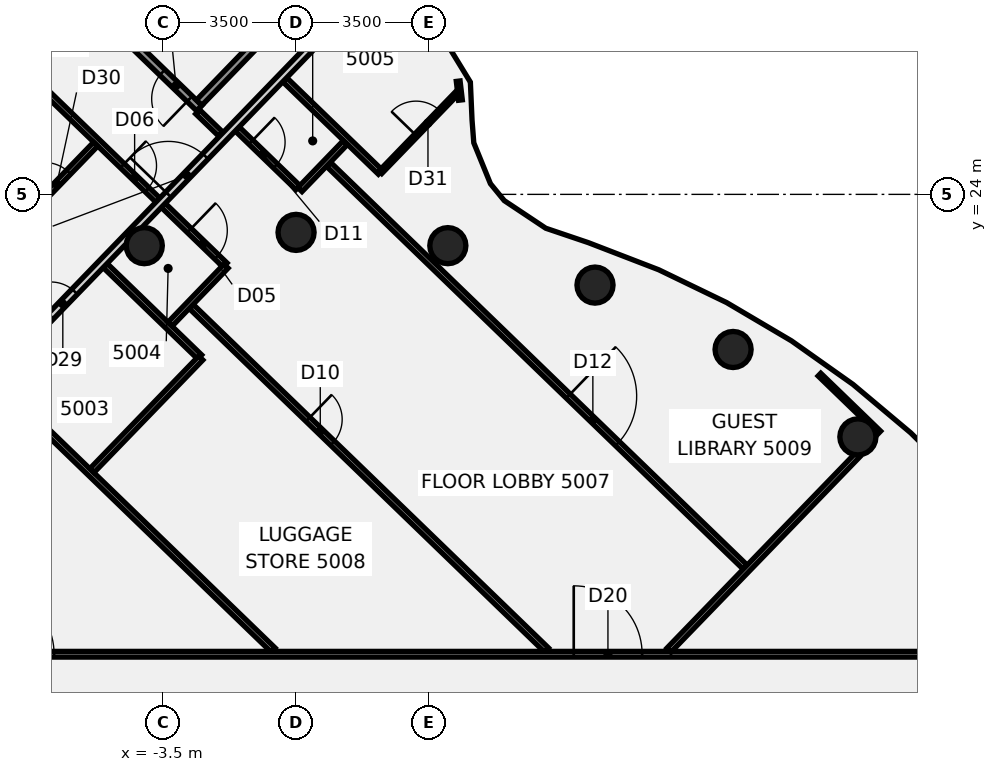
"""IFC4 building model, lengths in metres.
Left out: names, types, materials, properties, quantities, classifications, styles, units other than length and angle.
Written with IfcOpenShell. Run it as: python <this file> out.ifc"""

import sys

from ifc_helpers import new_model, si_unit, direction, frame, frame_2d, origin, origin_2d, place, context, subcontext, project, spatial, rectangle, circle, extrude, element, fill, save


model = new_model("IFC4")
c1 = context("Model", 3, precision=1e-05, world=origin(), true_north=direction((0.0, 1.0)))
c2 = subcontext(c1, "Body", "Model", "MODEL_VIEW")
j1 = project(units=[si_unit("LENGTHUNIT", "METRE"), si_unit("PLANEANGLEUNIT", "RADIAN")], contexts=[c1])
p1 = place(None, origin())
s1 = spatial("IfcSite", under=j1, at=p1, CompositionType="ELEMENT")
p2 = place(p1, origin())
s2 = spatial("IfcBuilding", under=s1, at=p2, CompositionType="ELEMENT")
p3 = place(p2, frame((0.0, 0.0, 200.5)))
s3 = spatial("IfcBuildingStorey", under=s2, at=p3, CompositionType="ELEMENT", Elevation=200.5)
for number, where, z_axis, x_axis in (
    (1, (14.784, 17.619, -0.14), (0.0, 0.0, 1.0), (1.0, 0.0, 0.0)),
    (2, (11.5, 19.919, -0.14), (0.0, 0.0, 1.0), (1.0, 0.0, 0.0)),
    (3, (7.866, 21.613, -0.14), (0.0, 0.0, 1.0), (1.0, 0.0, 0.0)),
    (4, (3.994, 22.651, -0.14), (0.0, 0.0, 1.0), (1.0, 0.0, 0.0)),
    (5, (0.0, 23.0, -0.14), (0.0, 0.0, 1.0), (1.0, 0.0, 0.0)),
    (6, (-3.994, 22.651, -0.14), (0.0, 0.0, 1.0), (1.0, 0.0, 0.0)),
):
    element("IfcColumn", number, at=place(p3, frame(where, z_axis=z_axis, x_axis=x_axis)), inside=s3, PredefinedType="COLUMN", context=c2, shape_type="SweptSolid", body=[
        extrude(circle(Radius=0.475, at=origin_2d()), origin(), (0.0, 0.0, 1.0), 3.6),
    ])
p4 = place(p3, frame((-11.71, 22.75, 0.0), z_axis=(0.0, 0.0, 1.0), x_axis=(0.718952314135, -0.695059400339, 0.0)))
e7 = element("IfcWall", 7, at=p4, inside=s3, PredefinedType="PARTITIONING", context=c2, shape_type="SweptSolid", body=[
    extrude(rectangle(XDim=15.45, YDim=0.15, at=frame_2d((7.725, 0.0))), origin(), (0.0, 0.0, 1.0), 2.864),
])
p5 = place(p3, frame((-9.979, 29.977, 0.0), z_axis=(0.0, 0.0, 1.0), x_axis=(0.719187723666, -0.694815815975, 0.0)))
e8 = element("IfcWall", 8, at=p5, inside=s3, PredefinedType="PARTITIONING", context=c2, shape_type="SweptSolid", body=[
    extrude(rectangle(XDim=11.28, YDim=0.15, at=frame_2d((5.64, 0.0))), origin(), (0.0, 0.0, 1.0), 2.864),
])
p6 = place(p5, frame((9.97, 0.0, 0.0)))
e9 = element("IfcOpeningElement", 9, at=p6, cuts=e8, PredefinedType="OPENING", context=c2, shape_type="SweptSolid", body=[
    extrude(rectangle(XDim=1.0, YDim=2.1, at=frame_2d((0.5, 1.05))), frame((0.0, 0.085, 0.0), z_axis=(0.0, -1.0, 0.0), x_axis=(1.0, 0.0, 0.0)), (0.0, 0.0, 1.0), 0.17),
])
p7 = place(p5, frame((7.519, 0.0, 0.0)))
e10 = element("IfcOpeningElement", 10, at=p7, cuts=e8, PredefinedType="OPENING", context=c2, shape_type="SweptSolid", body=[
    extrude(rectangle(XDim=0.9, YDim=2.1, at=frame_2d((0.45, 1.05))), frame((0.0, 0.085, 0.0), z_axis=(0.0, -1.0, 0.0), x_axis=(1.0, 0.0, 0.0)), (0.0, 0.0, 1.0), 0.17),
])
p8 = place(p5, frame((0.82, 0.0, 0.0)))
e11 = element("IfcOpeningElement", 11, at=p8, cuts=e8, PredefinedType="OPENING", context=c2, shape_type="SweptSolid", body=[
    extrude(rectangle(XDim=0.9, YDim=2.1, at=frame_2d((0.45, 1.05))), frame((0.0, 0.085, 0.0), z_axis=(0.0, -1.0, 0.0), x_axis=(1.0, 0.0, 0.0)), (0.0, 0.0, 1.0), 0.17),
])
p9 = place(p3, frame((-2.588, 26.171, 0.0), z_axis=(0.0, 0.0, 1.0), x_axis=(0.718920607155, -0.695092195761, 0.0)))
e12 = element("IfcWall", 12, at=p9, inside=s3, PredefinedType="PARTITIONING", context=c2, shape_type="SweptSolid", body=[
    extrude(rectangle(XDim=0.84, YDim=0.15, at=frame_2d((0.42, 0.0))), origin(), (0.0, 0.0, 1.0), 2.864),
])
p10 = place(p3, frame((-5.023, 22.127, 0.0), z_axis=(0.0, 0.0, 1.0), x_axis=(0.718790912946, -0.695226310971, 0.0)))
e13 = element("IfcWall", 13, at=p10, inside=s3, PredefinedType="PARTITIONING", context=c2, shape_type="SweptSolid", body=[
    extrude(rectangle(XDim=3.46, YDim=0.15, at=frame_2d((1.73, 0.0))), origin(), (0.0, 0.0, 1.0), 2.864),
])
p11 = place(p3, frame((-2.757, 21.048, 0.0), z_axis=(0.0, 0.0, 1.0), x_axis=(0.718984622922, -0.695025979371, 0.0)))
e14 = element("IfcWall", 14, at=p11, inside=s3, PredefinedType="PARTITIONING", context=c2, shape_type="SweptSolid", body=[
    extrude(rectangle(XDim=13.002, YDim=0.15, at=frame_2d((6.501, 0.0))), origin(), (0.0, 0.0, 1.0), 2.864),
])
p12 = place(p11, frame((4.27, 0.0, 0.0)))
e15 = element("IfcOpeningElement", 15, at=p12, cuts=e14, PredefinedType="OPENING", context=c2, shape_type="SweptSolid", body=[
    extrude(rectangle(XDim=0.9, YDim=2.1, at=frame_2d((0.45, 1.05))), frame((0.0, 0.085, 0.0), z_axis=(0.0, -1.0, 0.0), x_axis=(1.0, 0.0, 0.0)), (0.0, 0.0, 1.0), 0.17),
])
p13 = place(p3, frame((-1.548, 25.721, 0.0), z_axis=(0.0, 0.0, 1.0), x_axis=(0.718940736349, -0.695071375916, 0.0)))
e16 = element("IfcWall", 16, at=p13, inside=s3, PredefinedType="PARTITIONING", context=c2, shape_type="SweptSolid", body=[
    extrude(rectangle(XDim=2.219, YDim=0.15, at=frame_2d((1.11, 0.0))), origin(), (0.0, 0.0, 1.0), 2.864),
])
p14 = place(p13, frame((0.5, 0.0, 0.0)))
e17 = element("IfcOpeningElement", 17, at=p14, cuts=e16, PredefinedType="OPENING", context=c2, shape_type="SweptSolid", body=[
    extrude(rectangle(XDim=0.9, YDim=2.1, at=frame_2d((0.45, 1.05))), frame((0.0, 0.085, 0.0), z_axis=(0.0, -1.0, 0.0), x_axis=(1.0, 0.0, 0.0)), (0.0, 0.0, 1.0), 0.17),
])
p15 = place(p3, frame((-0.297, 27.017, 0.0), z_axis=(0.0, 0.0, 1.0), x_axis=(0.718866356864, -0.695148301422, 0.0)))
e18 = element("IfcWall", 18, at=p15, inside=s3, PredefinedType="PARTITIONING", context=c2, shape_type="SweptSolid", body=[
    extrude(rectangle(XDim=3.5, YDim=0.15, at=frame_2d((1.75, 0.0))), origin(), (0.0, 0.0, 1.0), 2.864),
])
p16 = place(p3, frame((0.857, 24.787, 0.0), z_axis=(0.0, 0.0, 1.0), x_axis=(0.718987308742, -0.695023200956, 0.0)))
e19 = element("IfcWall", 19, at=p16, inside=s3, PredefinedType="PARTITIONING", context=c2, shape_type="SweptSolid", body=[
    extrude(rectangle(XDim=15.241, YDim=0.15, at=frame_2d((7.621, 0.0))), origin(), (0.0, 0.0, 1.0), 2.864),
])
p17 = place(p16, frame((8.77, 0.0, 0.0)))
e20 = element("IfcOpeningElement", 20, at=p17, cuts=e19, PredefinedType="OPENING", context=c2, shape_type="SweptSolid", body=[
    extrude(rectangle(XDim=1.8, YDim=2.1, at=frame_2d((0.9, 1.05))), frame((0.0, 0.085, 0.0), z_axis=(0.0, -1.0, 0.0), x_axis=(1.0, 0.0, 0.0)), (0.0, 0.0, 1.0), 0.17),
])
p18 = place(p3, frame((13.773, 19.257, 0.0), z_axis=(0.0, 0.0, 1.0), x_axis=(0.718817623738, -0.695198693758, 0.0)))
e21 = element("IfcWall", 21, at=p18, inside=s3, PredefinedType="PARTITIONING", context=c2, shape_type="SweptSolid", body=[
    extrude(rectangle(XDim=2.191, YDim=0.1, at=frame_2d((1.096, 0.0))), origin(), (0.0, 0.0, 1.0), 2.864),
])
p19 = place(p3, frame((-17.065, 11.9, 0.0), z_axis=(0.0, 0.0, 1.0), x_axis=(1.0, 0.0, 0.0)))
e22 = element("IfcWall", 22, at=p19, inside=s3, PredefinedType="PARTITIONING", context=c2, shape_type="SweptSolid", body=[
    extrude(rectangle(XDim=34.165, YDim=0.15, at=frame_2d((17.083, 0.0))), origin(), (0.0, 0.0, 1.0), 2.864),
])
p20 = place(p19, frame((24.372, 0.0, 0.0)))
e23 = element("IfcOpeningElement", 23, at=p20, cuts=e22, PredefinedType="OPENING", context=c2, shape_type="SweptSolid", body=[
    extrude(rectangle(XDim=1.8, YDim=2.1, at=frame_2d((0.9, 1.05))), frame((0.0, 0.085, 0.0), z_axis=(0.0, -1.0, 0.0), x_axis=(1.0, 0.0, 0.0)), (0.0, 0.0, 1.0), 0.17),
])
p21 = place(p19, frame((8.898, 0.0, 0.0)))
e24 = element("IfcOpeningElement", 24, at=p21, cuts=e22, PredefinedType="OPENING", context=c2, shape_type="SweptSolid", body=[
    extrude(rectangle(XDim=1.8, YDim=2.1, at=frame_2d((0.9, 1.05))), frame((0.0, 0.085, 0.0), z_axis=(0.0, -1.0, 0.0), x_axis=(1.0, 0.0, 0.0)), (0.0, 0.0, 1.0), 0.17),
])
p22 = place(p19, frame((3.048, 0.0, 0.0)))
e25 = element("IfcOpeningElement", 25, at=p22, cuts=e22, PredefinedType="OPENING", context=c2, shape_type="SweptSolid", body=[
    extrude(rectangle(XDim=1.8, YDim=2.1, at=frame_2d((0.9, 1.05))), frame((0.0, 0.085, 0.0), z_axis=(0.0, -1.0, 0.0), x_axis=(1.0, 0.0, 0.0)), (0.0, 0.0, 1.0), 0.17),
])
p23 = place(p3, frame((-13.883, 26.055, 0.0), z_axis=(0.0, 0.0, 1.0), x_axis=(0.695083477894, 0.718929035969, 0.0)))
e26 = element("IfcWall", 26, at=p23, inside=s3, PredefinedType="PARTITIONING", context=c2, shape_type="SweptSolid", body=[
    extrude(rectangle(XDim=13.433, YDim=0.15, at=frame_2d((6.716, 0.0))), origin(), (0.0, 0.0, 1.0), 2.864),
])
p24 = place(p23, frame((5.833, 0.0, 0.0)))
e27 = element("IfcOpeningElement", 27, at=p24, cuts=e26, PredefinedType="OPENING", context=c2, shape_type="SweptSolid", body=[
    extrude(rectangle(XDim=1.8, YDim=2.1, at=frame_2d((0.9, 1.05))), frame((0.0, 0.085, 0.0), z_axis=(0.0, -1.0, 0.0), x_axis=(1.0, 0.0, 0.0)), (0.0, 0.0, 1.0), 0.17),
])
p25 = place(p3, frame((-7.958, 19.235, 0.0), z_axis=(0.0, 0.0, 1.0), x_axis=(0.694993988342, 0.719015546542, 0.0)))
e28 = element("IfcWall", 28, at=p25, inside=s3, PredefinedType="PARTITIONING", context=c2, shape_type="SweptSolid", body=[
    extrude(rectangle(XDim=14.219, YDim=0.2, at=frame_2d((7.109, 0.0))), origin(), (0.0, 0.0, 1.0), 2.864),
])
p26 = place(p25, frame((6.619, 0.0, 0.0)))
e29 = element("IfcOpeningElement", 29, at=p26, cuts=e28, PredefinedType="OPENING", context=c2, shape_type="SweptSolid", body=[
    extrude(rectangle(XDim=1.4, YDim=2.1, at=frame_2d((0.7, 1.05))), frame((0.0, 0.11, 0.0), z_axis=(0.0, -1.0, 0.0), x_axis=(1.0, 0.0, 0.0)), (0.0, 0.0, 1.0), 0.22),
])
p27 = place(p25, frame((2.17, 0.0, 0.0)))
e30 = element("IfcOpeningElement", 30, at=p27, cuts=e28, PredefinedType="OPENING", context=c2, shape_type="SweptSolid", body=[
    extrude(rectangle(XDim=0.9, YDim=2.1, at=frame_2d((0.45, 1.05))), frame((0.0, 0.11, 0.0), z_axis=(0.0, -1.0, 0.0), x_axis=(1.0, 0.0, 0.0)), (0.0, 0.0, 1.0), 0.22),
])
p28 = place(p3, frame((-7.027, 23.507, 0.0), z_axis=(0.0, 0.0, 1.0), x_axis=(0.694895234989, 0.719110987532, 0.0)))
e31 = element("IfcWall", 31, at=p28, inside=s3, PredefinedType="PARTITIONING", context=c2, shape_type="SweptSolid", body=[
    extrude(rectangle(XDim=2.521, YDim=0.15, at=frame_2d((1.26, 0.0))), origin(), (0.0, 0.0, 1.0), 2.864),
])
p29 = place(p28, frame((0.6, 0.0, 0.0)))
e32 = element("IfcOpeningElement", 32, at=p29, cuts=e31, PredefinedType="OPENING", context=c2, shape_type="SweptSolid", body=[
    extrude(rectangle(XDim=0.9, YDim=2.1, at=frame_2d((0.45, 1.05))), frame((0.0, 0.085, 0.0), z_axis=(0.0, -1.0, 0.0), x_axis=(1.0, 0.0, 0.0)), (0.0, 0.0, 1.0), 0.17),
])
p30 = place(p3, frame((-5.37, 16.732, 0.0), z_axis=(0.0, 0.0, 1.0), x_axis=(0.695063966074, 0.718947900106, 0.0)))
e33 = element("IfcWall", 33, at=p30, inside=s3, PredefinedType="PARTITIONING", context=c2, shape_type="SweptSolid", body=[
    extrude(rectangle(XDim=4.119, YDim=0.15, at=frame_2d((2.06, 0.0))), origin(), (0.0, 0.0, 1.0), 2.864),
])
p31 = place(p3, frame((2.22, 24.583, 0.0), z_axis=(0.0, 0.0, 1.0), x_axis=(0.695100387208, 0.718912687121, 0.0)))
e34 = element("IfcWall", 34, at=p31, inside=s3, PredefinedType="PARTITIONING", context=c2, shape_type="SweptSolid", body=[
    extrude(rectangle(XDim=2.902, YDim=0.1, at=frame_2d((1.451, 0.0))), origin(), (0.0, 0.0, 1.0), 2.864),
])
p32 = place(p31, frame((1.35, 0.0, 0.0)))
e35 = element("IfcOpeningElement", 35, at=p32, cuts=e34, PredefinedType="OPENING", context=c2, shape_type="SweptSolid", body=[
    extrude(rectangle(XDim=0.9, YDim=2.1, at=frame_2d((0.45, 1.05))), frame((0.0, 0.06, 0.0), z_axis=(0.0, -1.0, 0.0), x_axis=(1.0, 0.0, 0.0)), (0.0, 0.0, 1.0), 0.12),
])
p33 = place(p3, frame((-3.314, 20.586, 0.0), z_axis=(0.0, 0.0, 1.0), x_axis=(0.694502029341, 0.719490744375, 0.0)))
e36 = element("IfcWall", 36, at=p33, inside=s3, PredefinedType="PARTITIONING", context=c2, shape_type="SweptSolid", body=[
    extrude(rectangle(XDim=2.12, YDim=0.15, at=frame_2d((1.06, 0.0))), origin(), (0.0, 0.0, 1.0), 2.864),
])
p34 = place(p3, frame((0.103, 24.125, 0.0), z_axis=(0.0, 0.0, 1.0), x_axis=(0.694508401996, 0.719484592995, 0.0)))
e37 = element("IfcWall", 37, at=p34, inside=s3, PredefinedType="PARTITIONING", context=c2, shape_type="SweptSolid", body=[
    extrude(rectangle(XDim=1.72, YDim=0.15, at=frame_2d((0.86, 0.0))), origin(), (0.0, 0.0, 1.0), 2.864),
])
p35 = place(p3, frame((9.812, 12.008, 0.0), z_axis=(0.0, 0.0, 1.0), x_axis=(0.695134111226, 0.718880078601, 0.0)))
e38 = element("IfcWall", 38, at=p35, inside=s3, PredefinedType="PARTITIONING", context=c2, shape_type="SweptSolid", body=[
    extrude(rectangle(XDim=7.135, YDim=0.15, at=frame_2d((3.568, 0.0))), origin(), (0.0, 0.0, 1.0), 2.864),
])
p36 = place(p3, frame((4.325, 26.482, 0.0), z_axis=(0.0, 0.0, 1.0), x_axis=(-0.117181186143, 0.993110552564, 0.0)))
e39 = element("IfcWall", 39, at=p36, inside=s3, PredefinedType="PARTITIONING", context=c2, shape_type="SweptSolid", body=[
    extrude(rectangle(XDim=0.5, YDim=0.1, at=frame_2d((0.25, 0.0))), origin(), (0.0, 0.0, 1.0), 2.864),
])
p37 = place(p3, frame((-2.548, 26.271, -0.14), z_axis=(0.0, 0.0, 1.0), x_axis=(-0.718993231632, 0.695017073796, 0.0)))
e40 = element("IfcWall", 40, at=p37, inside=s3, PredefinedType="SHEAR", context=c2, shape_type="SweptSolid", body=[
    extrude(rectangle(XDim=6.7, YDim=0.2, at=frame_2d((3.35, 0.0))), origin(), (0.0, 0.0, 1.0), 3.004),
])
p38 = place(p37, frame((0.35, 0.0, 0.0)))
e41 = element("IfcOpeningElement", 41, at=p38, cuts=e40, PredefinedType="OPENING", context=c2, shape_type="SweptSolid", body=[
    extrude(rectangle(XDim=1.0, YDim=2.1, at=frame_2d((0.5, 1.05))), frame((0.0, 0.11, 0.0), z_axis=(0.0, -1.0, 0.0), x_axis=(1.0, 0.0, 0.0)), (0.0, 0.0, 1.0), 0.22),
])
p39 = place(p3, frame((-0.326, 28.713, -0.14), z_axis=(0.0, 0.0, 1.0), x_axis=(-0.695027355379, -0.718983292765, 0.0)))
e42 = element("IfcWall", 42, at=p39, inside=s3, PredefinedType="SHEAR", context=c2, shape_type="SweptSolid", body=[
    extrude(rectangle(XDim=3.2, YDim=0.2, at=frame_2d((1.6, 0.0))), origin(), (0.0, 0.0, 1.0), 3.004),
])
p40 = place(p6, frame((1.0, 0.0, 0.0), z_axis=(0.0, 0.0, 1.0), x_axis=(-1.0, 0.0, 0.0)))
e43 = element("IfcDoor", 43, at=p40, inside=s3, OperationType="SINGLE_SWING_RIGHT", PredefinedType="DOOR", context=c2, shape_type="SweptSolid", body=[
    extrude(rectangle(XDim=1.0, YDim=2.1, at=frame_2d((0.5, 1.05))), frame((0.0, 0.025, 0.0), z_axis=(0.0, -1.0, 0.0), x_axis=(1.0, 0.0, 0.0)), (0.0, 0.0, 1.0), 0.05),
])
fill(e9, e43)
p41 = place(p7, frame((0.9, 0.0, 0.0), z_axis=(0.0, 0.0, 1.0), x_axis=(-1.0, 0.0, 0.0)))
e44 = element("IfcDoor", 44, at=p41, inside=s3, OperationType="SINGLE_SWING_RIGHT", PredefinedType="DOOR", context=c2, shape_type="SweptSolid", body=[
    extrude(rectangle(XDim=0.9, YDim=2.1, at=frame_2d((0.45, 1.05))), frame((0.0, 0.025, 0.0), z_axis=(0.0, -1.0, 0.0), x_axis=(1.0, 0.0, 0.0)), (0.0, 0.0, 1.0), 0.05),
])
fill(e10, e44)
p42 = place(p12, frame((0.9, 0.0, 0.0), z_axis=(0.0, 0.0, 1.0), x_axis=(-1.0, 0.0, 0.0)))
e45 = element("IfcDoor", 45, at=p42, inside=s3, OperationType="SINGLE_SWING_LEFT", PredefinedType="DOOR", context=c2, shape_type="SweptSolid", body=[
    extrude(rectangle(XDim=0.9, YDim=2.1, at=frame_2d((0.45, 1.05))), frame((0.0, 0.025, 0.0), z_axis=(0.0, -1.0, 0.0), x_axis=(1.0, 0.0, 0.0)), (0.0, 0.0, 1.0), 0.05),
])
fill(e15, e45)
p43 = place(p14, origin())
e46 = element("IfcDoor", 46, at=p43, inside=s3, OperationType="SINGLE_SWING_RIGHT", PredefinedType="DOOR", context=c2, shape_type="SweptSolid", body=[
    extrude(rectangle(XDim=0.9, YDim=2.1, at=frame_2d((0.45, 1.05))), frame((0.0, 0.025, 0.0), z_axis=(0.0, -1.0, 0.0), x_axis=(1.0, 0.0, 0.0)), (0.0, 0.0, 1.0), 0.05),
])
fill(e17, e46)
p44 = place(p17, origin())
e47 = element("IfcDoor", 47, at=p44, inside=s3, OperationType="DOUBLE_DOOR_SINGLE_SWING", PredefinedType="DOOR", context=c2, shape_type="SweptSolid", body=[
    extrude(rectangle(XDim=1.8, YDim=2.1, at=frame_2d((0.9, 1.05))), frame((0.0, 0.025, 0.0), z_axis=(0.0, -1.0, 0.0), x_axis=(1.0, 0.0, 0.0)), (0.0, 0.0, 1.0), 0.05),
])
fill(e20, e47)
p45 = place(p20, frame((1.8, 0.0, 0.0), z_axis=(0.0, 0.0, 1.0), x_axis=(-1.0, 0.0, 0.0)))
e48 = element("IfcDoor", 48, at=p45, inside=s3, OperationType="DOUBLE_DOOR_SINGLE_SWING", PredefinedType="DOOR", context=c2, shape_type="SweptSolid", body=[
    extrude(rectangle(XDim=1.8, YDim=2.1, at=frame_2d((0.9, 1.05))), frame((0.0, 0.025, 0.0), z_axis=(0.0, -1.0, 0.0), x_axis=(1.0, 0.0, 0.0)), (0.0, 0.0, 1.0), 0.05),
])
fill(e23, e48)
p46 = place(p21, origin())
e49 = element("IfcDoor", 49, at=p46, inside=s3, OperationType="DOUBLE_DOOR_SINGLE_SWING", PredefinedType="DOOR", context=c2, shape_type="SweptSolid", body=[
    extrude(rectangle(XDim=1.8, YDim=2.1, at=frame_2d((0.9, 1.05))), frame((0.0, 0.025, 0.0), z_axis=(0.0, -1.0, 0.0), x_axis=(1.0, 0.0, 0.0)), (0.0, 0.0, 1.0), 0.05),
])
fill(e24, e49)
p47 = place(p26, frame((1.4, 0.0, 0.0), z_axis=(0.0, 0.0, 1.0), x_axis=(-1.0, 0.0, 0.0)))
e50 = element("IfcDoor", 50, at=p47, inside=s3, OperationType="DOUBLE_DOOR_SINGLE_SWING", PredefinedType="DOOR", context=c2, shape_type="SweptSolid", body=[
    extrude(rectangle(XDim=1.4, YDim=2.1, at=frame_2d((0.7, 1.05))), frame((0.0, 0.025, 0.0), z_axis=(0.0, -1.0, 0.0), x_axis=(1.0, 0.0, 0.0)), (0.0, 0.0, 1.0), 0.05),
])
fill(e29, e50)
p48 = place(p27, frame((0.9, 0.0, 0.0), z_axis=(0.0, 0.0, 1.0), x_axis=(-1.0, 0.0, 0.0)))
e51 = element("IfcDoor", 51, at=p48, inside=s3, OperationType="SINGLE_SWING_LEFT", PredefinedType="DOOR", context=c2, shape_type="SweptSolid", body=[
    extrude(rectangle(XDim=0.9, YDim=2.1, at=frame_2d((0.45, 1.05))), frame((0.0, 0.025, 0.0), z_axis=(0.0, -1.0, 0.0), x_axis=(1.0, 0.0, 0.0)), (0.0, 0.0, 1.0), 0.05),
])
fill(e30, e51)
p49 = place(p29, origin())
e52 = element("IfcDoor", 52, at=p49, inside=s3, OperationType="SINGLE_SWING_RIGHT", PredefinedType="DOOR", context=c2, shape_type="SweptSolid", body=[
    extrude(rectangle(XDim=0.9, YDim=2.1, at=frame_2d((0.45, 1.05))), frame((0.0, 0.025, 0.0), z_axis=(0.0, -1.0, 0.0), x_axis=(1.0, 0.0, 0.0)), (0.0, 0.0, 1.0), 0.05),
])
fill(e32, e52)
p50 = place(p32, origin())
e53 = element("IfcDoor", 53, at=p50, inside=s3, OperationType="SINGLE_SWING_LEFT", PredefinedType="DOOR", context=c2, shape_type="SweptSolid", body=[
    extrude(rectangle(XDim=0.9, YDim=2.1, at=frame_2d((0.45, 1.05))), frame((0.0, 0.025, 0.0), z_axis=(0.0, -1.0, 0.0), x_axis=(1.0, 0.0, 0.0)), (0.0, 0.0, 1.0), 0.05),
])
fill(e35, e53)
p51 = place(p38, origin())
e54 = element("IfcDoor", 54, at=p51, inside=s3, OperationType="SINGLE_SWING_LEFT", PredefinedType="DOOR", context=c2, shape_type="SweptSolid", body=[
    extrude(rectangle(XDim=1.0, YDim=2.1, at=frame_2d((0.5, 1.05))), frame((0.0, 0.025, 0.0), z_axis=(0.0, -1.0, 0.0), x_axis=(1.0, 0.0, 0.0)), (0.0, 0.0, 1.0), 0.05),
])
fill(e41, e54)
save(model, sys.argv[1])
